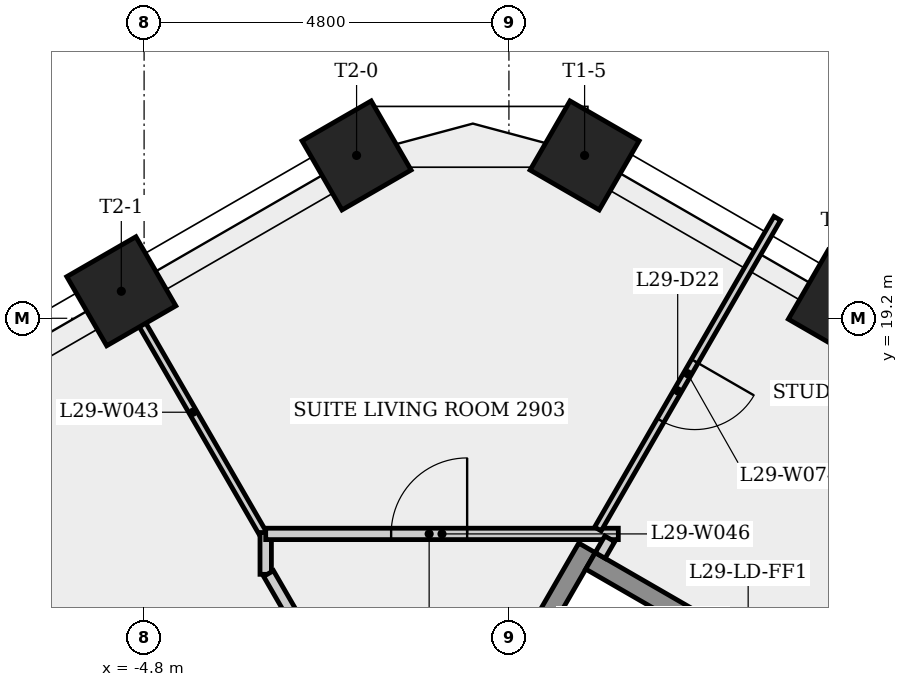
"""IFC4 building model, lengths in metres.
Left out: names, types, materials, properties, quantities, classifications, styles, units other than length and angle.
Written with IfcOpenShell. Run it as: python <this file> out.ifc"""

import sys

from ifc_helpers import new_model, si_unit, direction, frame, frame_2d, origin, origin_2d, place, context, subcontext, project, spatial, rectangle, extrude, element, fill, save


model = new_model("IFC4")
c1 = context("Model", 3, precision=1e-05, world=origin(), true_north=direction((0.0, 1.0)))
c2 = subcontext(c1, "Body", "Model", "MODEL_VIEW")
j1 = project(units=[si_unit("LENGTHUNIT", "METRE"), si_unit("PLANEANGLEUNIT", "RADIAN")], contexts=[c1])
p1 = place(None, origin())
s1 = spatial("IfcSite", under=j1, at=p1, CompositionType="ELEMENT")
p2 = place(p1, origin())
s2 = spatial("IfcBuilding", under=s1, at=p2, CompositionType="ELEMENT")
p3 = place(p2, frame((0.0, 0.0, 110.3)))
s3 = spatial("IfcBuildingStorey", under=s2, at=p3, CompositionType="ELEMENT", Elevation=110.3)
for number, where, z_axis, x_axis in (
    (1, (4.394, 19.381, 0.0), (0.0, 0.0, 1.0), (0.5, 0.866, 0.0)),
    (2, (0.996, 21.343, 0.0), (0.0, 0.0, 1.0), (0.5, 0.866, 0.0)),
    (3, (-2.004, 21.343, 0.0), (0.0, 0.0, 1.0), (-0.5, 0.866, 0.0)),
    (4, (-5.1, 19.556, 0.0), (0.0, 0.0, 1.0), (-0.5, 0.866, 0.0)),
):
    element("IfcColumn", number, at=place(p3, frame(where, z_axis=z_axis, x_axis=x_axis)), inside=s3, PredefinedType="COLUMN", context=c2, shape_type="SweptSolid", body=[
        extrude(rectangle(XDim=1.05, YDim=1.05, at=origin_2d()), origin(), (0.0, 0.0, 1.0), 3.4),
    ])
p4 = place(p3, frame((-3.232, 16.362, 0.0), z_axis=(0.0, 0.0, 1.0), x_axis=(-0.499992827086, 0.866029545028, 0.0)))
e5 = element("IfcWall", 5, at=p4, inside=s3, PredefinedType="PARTITIONING", context=c2, shape_type="SweptSolid", body=[
    extrude(rectangle(XDim=3.7, YDim=0.1, at=frame_2d((1.85, 0.0))), origin(), (0.0, 0.0, 1.0), 3.05),
])
p5 = place(p3, frame((-3.2, 15.831, 0.0), z_axis=(0.0, 0.0, 1.0), x_axis=(0.0, 1.0, 0.0)))
e6 = element("IfcWall", 6, at=p5, inside=s3, PredefinedType="PARTITIONING", context=c2, shape_type="SweptSolid", body=[
    extrude(rectangle(XDim=0.55, YDim=0.15, at=frame_2d((0.275, 0.0))), origin(), (0.0, 0.0, 1.0), 3.05),
])
p6 = place(p3, frame((-3.2, 16.363, 0.0), z_axis=(0.0, 0.0, 1.0), x_axis=(1.0, 0.0, 0.0)))
e7 = element("IfcWall", 7, at=p6, inside=s3, PredefinedType="PARTITIONING", context=c2, shape_type="SweptSolid", body=[
    extrude(rectangle(XDim=4.639, YDim=0.15, at=frame_2d((2.32, 0.0))), origin(), (0.0, 0.0, 1.0), 3.05),
])
p7 = place(p6, frame((1.65, 0.0, 0.0)))
e8 = element("IfcOpeningElement", 8, at=p7, cuts=e7, PredefinedType="OPENING", context=c2, shape_type="SweptSolid", body=[
    extrude(rectangle(XDim=1.0, YDim=2.1, at=frame_2d((0.5, 1.05))), frame((0.0, 0.085, 0.0), z_axis=(0.0, -1.0, 0.0), x_axis=(1.0, 0.0, 0.0)), (0.0, 0.0, 1.0), 0.17),
])
p8 = place(p3, frame((-1.4, 12.788, 0.0), z_axis=(0.0, 0.0, 1.0), x_axis=(-0.500012199891, 0.86601836006, 0.0)))
e9 = element("IfcWall", 9, at=p8, inside=s3, PredefinedType="PARTITIONING", context=c2, shape_type="SweptSolid", body=[
    extrude(rectangle(XDim=3.525, YDim=0.15, at=frame_2d((1.763, 0.0))), origin(), (0.0, 0.0, 1.0), 3.05),
])
p9 = place(p3, frame((-0.403, 13.702, 0.0), z_axis=(0.0, 0.0, 1.0), x_axis=(0.499976111731, 0.866039195244, 0.0)))
e10 = element("IfcWall", 10, at=p9, inside=s3, PredefinedType="SHEAR", context=c2, shape_type="SweptSolid", body=[
    extrude(rectangle(XDim=2.861, YDim=0.25, at=frame_2d((1.43, 0.0))), origin(), (0.0, 0.0, 1.0), 3.05),
])
p10 = place(p3, frame((1.073, 16.008, 0.0), z_axis=(0.0, 0.0, 1.0), x_axis=(0.866040211805, -0.499974350878, 0.0)))
e11 = element("IfcWall", 11, at=p10, inside=s3, PredefinedType="SHEAR", context=c2, shape_type="SweptSolid", body=[
    extrude(rectangle(XDim=3.3, YDim=0.25, at=frame_2d((1.65, 0.0))), origin(), (0.0, 0.0, 1.0), 3.05),
])
p11 = place(p3, frame((1.327, 16.298, 0.0), z_axis=(0.0, 0.0, 1.0), x_axis=(-0.500502949238, -0.865734831114, 0.0)))
e12 = element("IfcWall", 12, at=p11, inside=s3, PredefinedType="PARTITIONING", context=c2, shape_type="SweptSolid", body=[
    extrude(rectangle(XDim=0.253, YDim=0.15, at=frame_2d((0.126, 0.0))), origin(), (0.0, 0.0, 1.0), 3.05),
])
p12 = place(p3, frame((3.531, 20.515, 0.0), z_axis=(0.0, 0.0, 1.0), x_axis=(-0.500022469165, -0.866012430818, 0.0)))
e13 = element("IfcWall", 13, at=p12, inside=s3, PredefinedType="PARTITIONING", context=c2, shape_type="SweptSolid", body=[
    extrude(rectangle(XDim=4.719, YDim=0.1, at=frame_2d((2.36, 0.0))), origin(), (0.0, 0.0, 1.0), 3.05),
])
p13 = place(p12, frame((2.17, 0.0, 0.0)))
e14 = element("IfcOpeningElement", 14, at=p13, cuts=e13, PredefinedType="OPENING", context=c2, shape_type="SweptSolid", body=[
    extrude(rectangle(XDim=0.9, YDim=2.1, at=frame_2d((0.45, 1.05))), frame((0.0, 0.06, 0.0), z_axis=(0.0, -1.0, 0.0), x_axis=(1.0, 0.0, 0.0)), (0.0, 0.0, 1.0), 0.12),
])
p14 = place(p3, frame((3.885, 14.529, 0.0), z_axis=(0.0, 0.0, 1.0), x_axis=(0.499997628298, 0.866026773083, 0.0)))
e15 = element("IfcWall", 15, at=p14, inside=s3, PredefinedType="PARTITIONING", context=c2, shape_type="SweptSolid", body=[
    extrude(rectangle(XDim=1.075, YDim=0.2, at=frame_2d((0.538, 0.0))), origin(), (0.0, 0.0, 1.0), 3.05),
])
p15 = place(p7, origin())
e16 = element("IfcDoor", 16, at=p15, inside=s3, OperationType="SINGLE_SWING_RIGHT", PredefinedType="DOOR", context=c2, shape_type="SweptSolid", body=[
    extrude(rectangle(XDim=1.0, YDim=2.1, at=frame_2d((0.5, 1.05))), frame((0.0, 0.025, 0.0), z_axis=(0.0, -1.0, 0.0), x_axis=(1.0, 0.0, 0.0)), (0.0, 0.0, 1.0), 0.05),
])
fill(e8, e16)
p16 = place(p13, origin())
e17 = element("IfcDoor", 17, at=p16, inside=s3, OperationType="SINGLE_SWING_LEFT", PredefinedType="DOOR", context=c2, shape_type="SweptSolid", body=[
    extrude(rectangle(XDim=0.9, YDim=2.1, at=frame_2d((0.45, 1.05))), frame((0.0, 0.025, 0.0), z_axis=(0.0, -1.0, 0.0), x_axis=(1.0, 0.0, 0.0)), (0.0, 0.0, 1.0), 0.05),
])
fill(e14, e17)
save(model, sys.argv[1])
